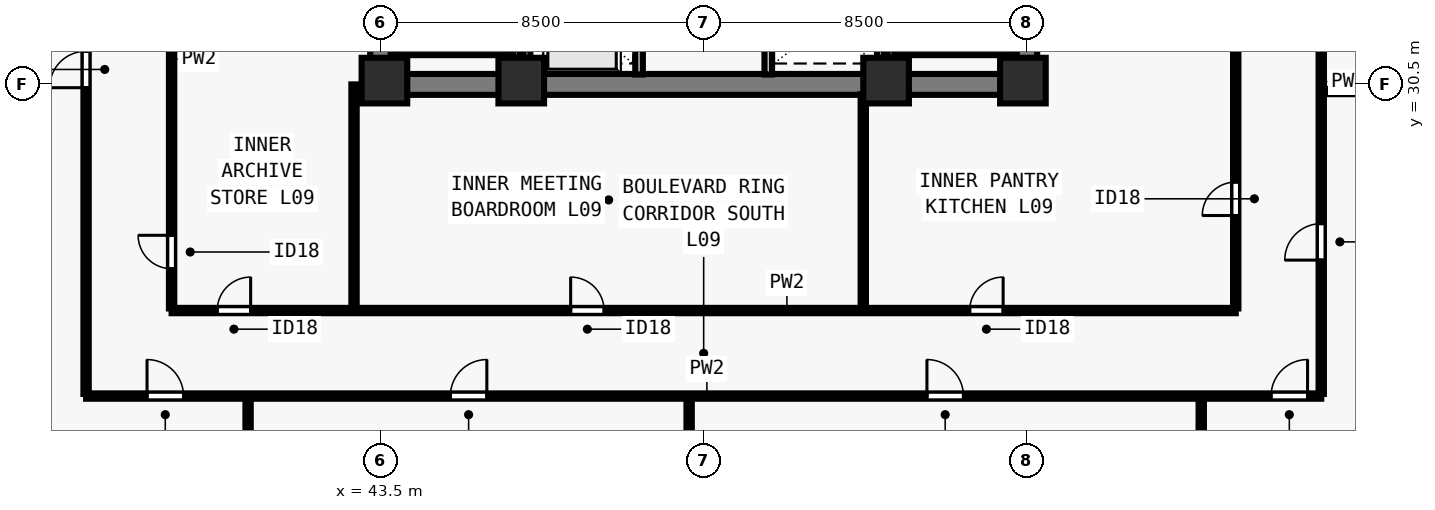
"""IFC4 building model, lengths in metres.
Left out: names, types, materials, properties, quantities, classifications, styles, units other than length and angle.
Written with IfcOpenShell. Run it as: python <this file> out.ifc"""

import sys

from ifc_helpers import new_model, si_unit, direction, frame, frame_2d, origin, origin_2d, place, context, subcontext, project, spatial, rectangle, extrude, element, fill, save


model = new_model("IFC4")
c1 = context("Model", 3, precision=1e-05, world=origin(), true_north=direction((0.0, 1.0)))
c2 = subcontext(c1, "Body", "Model", "MODEL_VIEW")
j1 = project(units=[si_unit("LENGTHUNIT", "METRE"), si_unit("PLANEANGLEUNIT", "RADIAN")], contexts=[c1])
p1 = place(None, origin())
s1 = spatial("IfcSite", under=j1, at=p1, CompositionType="ELEMENT")
p2 = place(p1, origin())
s2 = spatial("IfcBuilding", under=s1, at=p2, CompositionType="ELEMENT")
p3 = place(p2, frame((0.0, 0.0, 37.5)))
s3 = spatial("IfcBuildingStorey", under=s2, at=p3, CompositionType="ELEMENT", Elevation=37.5)
for number, where, z_axis, x_axis in (
    (1, (43.6, 30.6, 0.0), (0.0, 0.0, 1.0), (1.0, 0.0, 0.0)),
    (2, (47.2, 30.6, 0.0), (0.0, 0.0, 1.0), (1.0, 0.0, 0.0)),
    (3, (56.8, 30.6, 0.0), (0.0, 0.0, 1.0), (1.0, 0.0, 0.0)),
    (4, (60.4, 30.6, 0.0), (0.0, 0.0, 1.0), (1.0, 0.0, 0.0)),
):
    element("IfcColumn", number, at=place(p3, frame(where, z_axis=z_axis, x_axis=x_axis)), inside=s3, PredefinedType="COLUMN", context=c2, shape_type="SweptSolid", body=[
        extrude(rectangle(XDim=1.2, YDim=1.2, at=origin_2d()), origin(), (0.0, 0.0, 1.0), 3.5),
    ])
p4 = place(p3, frame((43.225, 30.5, 0.0), z_axis=(0.0, 0.0, 1.0), x_axis=(1.0, 0.0, 0.0)))
e5 = element("IfcWall", 5, at=p4, inside=s3, PredefinedType="SHEAR", context=c2, shape_type="SweptSolid", body=[
    extrude(rectangle(XDim=17.55, YDim=0.55, at=frame_2d((8.775, 0.0))), origin(), (0.0, 0.0, 1.0), 3.28),
])
for number, where, z_axis, x_axis in (
    (6, (43.5, 30.765, 0.0), (0.0, 0.0, 1.0), (0.0, 1.0, 0.0)),
    (7, (60.5, 30.765, 0.0), (0.0, 0.0, 1.0), (0.0, 1.0, 0.0)),
):
    element("IfcWall", number, at=place(p3, frame(where, z_axis=z_axis, x_axis=x_axis)), inside=s3, PredefinedType="SHEAR", context=c2, shape_type="SweptSolid", body=[
        extrude(rectangle(XDim=7.985, YDim=0.55, at=frame_2d((3.993, 0.0))), origin(), (0.0, 0.0, 1.0), 3.28),
    ])
p5 = place(p3, frame((50.3, 30.76, 0.0), z_axis=(0.0, 0.0, 1.0), x_axis=(0.0, 1.0, 0.0)))
e8 = element("IfcWall", 8, at=p5, inside=s3, PredefinedType="SOLIDWALL", context=c2, shape_type="SweptSolid", body=[
    extrude(rectangle(XDim=7.855, YDim=0.2, at=frame_2d((3.927, 0.0))), origin(), (0.0, 0.0, 1.0), 3.28),
])
p6 = place(p5, frame((0.79, 0.0, 0.0)))
e9 = element("IfcOpeningElement", 9, at=p6, cuts=e8, PredefinedType="OPENING", context=c2, shape_type="SweptSolid", body=[
    extrude(rectangle(XDim=1.1, YDim=2.2, at=frame_2d((0.55, 1.1))), frame((0.0, 0.11, 0.0), z_axis=(0.0, -1.0, 0.0), x_axis=(1.0, 0.0, 0.0)), (0.0, 0.0, 1.0), 0.22),
])
p7 = place(p5, frame((3.49, 0.0, 0.0)))
e10 = element("IfcOpeningElement", 10, at=p7, cuts=e8, PredefinedType="OPENING", context=c2, shape_type="SweptSolid", body=[
    extrude(rectangle(XDim=1.1, YDim=2.2, at=frame_2d((0.55, 1.1))), frame((0.0, 0.11, 0.0), z_axis=(0.0, -1.0, 0.0), x_axis=(1.0, 0.0, 0.0)), (0.0, 0.0, 1.0), 0.22),
])
p8 = place(p5, frame((6.19, 0.0, 0.0)))
e11 = element("IfcOpeningElement", 11, at=p8, cuts=e8, PredefinedType="OPENING", context=c2, shape_type="SweptSolid", body=[
    extrude(rectangle(XDim=1.1, YDim=2.2, at=frame_2d((0.55, 1.1))), frame((0.0, 0.11, 0.0), z_axis=(0.0, -1.0, 0.0), x_axis=(1.0, 0.0, 0.0)), (0.0, 0.0, 1.0), 0.22),
])
p9 = place(p3, frame((53.7, 30.76, 0.0), z_axis=(0.0, 0.0, 1.0), x_axis=(0.0, 1.0, 0.0)))
e12 = element("IfcWall", 12, at=p9, inside=s3, PredefinedType="SOLIDWALL", context=c2, shape_type="SweptSolid", body=[
    extrude(rectangle(XDim=7.855, YDim=0.2, at=frame_2d((3.927, 0.0))), origin(), (0.0, 0.0, 1.0), 3.28),
])
for number, where, z_axis, x_axis in (
    (13, (47.35, 30.76, 0.0), (0.0, 0.0, 1.0), (0.0, 1.0, 0.0)),
    (14, (56.65, 30.76, 0.0), (0.0, 0.0, 1.0), (0.0, 1.0, 0.0)),
):
    element("IfcWall", number, at=place(p3, frame(where, z_axis=z_axis, x_axis=x_axis)), inside=s3, PredefinedType="SOLIDWALL", context=c2, shape_type="SweptSolid", body=[
        extrude(rectangle(XDim=7.855, YDim=0.18, at=frame_2d((3.927, 0.0))), origin(), (0.0, 0.0, 1.0), 3.28),
    ])
p10 = place(p3, frame((35.75, 22.3, 0.0), z_axis=(0.0, 0.0, 1.0), x_axis=(1.0, 0.0, 0.0)))
e15 = element("IfcWall", 15, at=p10, inside=s3, PredefinedType="PARTITIONING", context=c2, shape_type="SweptSolid", body=[
    extrude(rectangle(XDim=32.5, YDim=0.14, at=frame_2d((16.25, 0.0))), origin(), (0.0, 0.0, 1.0), 3.28),
])
p11 = place(p10, frame((1.604, 0.0, 0.0)))
e16 = element("IfcOpeningElement", 16, at=p11, cuts=e15, PredefinedType="OPENING", context=c2, shape_type="SweptSolid", body=[
    extrude(rectangle(XDim=0.96, YDim=2.12, at=frame_2d((0.48, 1.06))), frame((0.0, 0.08, 0.0), z_axis=(0.0, -1.0, 0.0), x_axis=(1.0, 0.0, 0.0)), (0.0, 0.0, 1.0), 0.16),
])
p12 = place(p10, frame((9.585, 0.0, 0.0)))
e17 = element("IfcOpeningElement", 17, at=p12, cuts=e15, PredefinedType="OPENING", context=c2, shape_type="SweptSolid", body=[
    extrude(rectangle(XDim=0.96, YDim=2.12, at=frame_2d((0.48, 1.06))), frame((0.0, 0.08, 0.0), z_axis=(0.0, -1.0, 0.0), x_axis=(1.0, 0.0, 0.0)), (0.0, 0.0, 1.0), 0.16),
])
p13 = place(p10, frame((22.125, 0.0, 0.0)))
e18 = element("IfcOpeningElement", 18, at=p13, cuts=e15, PredefinedType="OPENING", context=c2, shape_type="SweptSolid", body=[
    extrude(rectangle(XDim=0.96, YDim=2.12, at=frame_2d((0.48, 1.06))), frame((0.0, 0.08, 0.0), z_axis=(0.0, -1.0, 0.0), x_axis=(1.0, 0.0, 0.0)), (0.0, 0.0, 1.0), 0.16),
])
p14 = place(p10, frame((31.18, 0.0, 0.0)))
e19 = element("IfcOpeningElement", 19, at=p14, cuts=e15, PredefinedType="OPENING", context=c2, shape_type="SweptSolid", body=[
    extrude(rectangle(XDim=0.96, YDim=2.12, at=frame_2d((0.48, 1.06))), frame((0.0, 0.08, 0.0), z_axis=(0.0, -1.0, 0.0), x_axis=(1.0, 0.0, 0.0)), (0.0, 0.0, 1.0), 0.16),
])
p15 = place(p3, frame((35.75, 22.355, 0.0), z_axis=(0.0, 0.0, 1.0), x_axis=(0.0, 1.0, 0.0)))
e20 = element("IfcWall", 20, at=p15, inside=s3, PredefinedType="PARTITIONING", context=c2, shape_type="SweptSolid", body=[
    extrude(rectangle(XDim=33.29, YDim=0.14, at=frame_2d((16.645, 0.0))), origin(), (0.0, 0.0, 1.0), 3.28),
])
p16 = place(p15, frame((8.058, 0.0, 0.0)))
e21 = element("IfcOpeningElement", 21, at=p16, cuts=e20, PredefinedType="OPENING", context=c2, shape_type="SweptSolid", body=[
    extrude(rectangle(XDim=0.96, YDim=2.12, at=frame_2d((0.48, 1.06))), frame((0.0, 0.08, 0.0), z_axis=(0.0, -1.0, 0.0), x_axis=(1.0, 0.0, 0.0)), (0.0, 0.0, 1.0), 0.16),
])
p17 = place(p15, frame((24.658, 0.0, 0.0)))
e22 = element("IfcOpeningElement", 22, at=p17, cuts=e20, PredefinedType="OPENING", context=c2, shape_type="SweptSolid", body=[
    extrude(rectangle(XDim=0.96, YDim=2.12, at=frame_2d((0.48, 1.06))), frame((0.0, 0.08, 0.0), z_axis=(0.0, -1.0, 0.0), x_axis=(1.0, 0.0, 0.0)), (0.0, 0.0, 1.0), 0.16),
])
p18 = place(p3, frame((68.25, 22.355, 0.0), z_axis=(0.0, 0.0, 1.0), x_axis=(0.0, 1.0, 0.0)))
e23 = element("IfcWall", 23, at=p18, inside=s3, PredefinedType="PARTITIONING", context=c2, shape_type="SweptSolid", body=[
    extrude(rectangle(XDim=33.29, YDim=0.14, at=frame_2d((16.645, 0.0))), origin(), (0.0, 0.0, 1.0), 3.28),
])
p19 = place(p18, frame((3.522, 0.0, 0.0)))
e24 = element("IfcOpeningElement", 24, at=p19, cuts=e23, PredefinedType="OPENING", context=c2, shape_type="SweptSolid", body=[
    extrude(rectangle(XDim=0.96, YDim=2.12, at=frame_2d((0.48, 1.06))), frame((0.0, 0.08, 0.0), z_axis=(0.0, -1.0, 0.0), x_axis=(1.0, 0.0, 0.0)), (0.0, 0.0, 1.0), 0.16),
])
p20 = place(p18, frame((11.956, 0.0, 0.0)))
e25 = element("IfcOpeningElement", 25, at=p20, cuts=e23, PredefinedType="OPENING", context=c2, shape_type="SweptSolid", body=[
    extrude(rectangle(XDim=0.96, YDim=2.12, at=frame_2d((0.48, 1.06))), frame((0.0, 0.08, 0.0), z_axis=(0.0, -1.0, 0.0), x_axis=(1.0, 0.0, 0.0)), (0.0, 0.0, 1.0), 0.16),
])
p21 = place(p18, frame((20.256, 0.0, 0.0)))
e26 = element("IfcOpeningElement", 26, at=p21, cuts=e23, PredefinedType="OPENING", context=c2, shape_type="SweptSolid", body=[
    extrude(rectangle(XDim=0.96, YDim=2.12, at=frame_2d((0.48, 1.06))), frame((0.0, 0.08, 0.0), z_axis=(0.0, -1.0, 0.0), x_axis=(1.0, 0.0, 0.0)), (0.0, 0.0, 1.0), 0.16),
])
p22 = place(p18, frame((28.422, 0.0, 0.0)))
e27 = element("IfcOpeningElement", 27, at=p22, cuts=e23, PredefinedType="OPENING", context=c2, shape_type="SweptSolid", body=[
    extrude(rectangle(XDim=0.96, YDim=2.12, at=frame_2d((0.48, 1.06))), frame((0.0, 0.08, 0.0), z_axis=(0.0, -1.0, 0.0), x_axis=(1.0, 0.0, 0.0)), (0.0, 0.0, 1.0), 0.16),
])
p23 = place(p3, frame((38.0, 24.55, 0.0), z_axis=(0.0, 0.0, 1.0), x_axis=(1.0, 0.0, 0.0)))
e28 = element("IfcWall", 28, at=p23, inside=s3, PredefinedType="PARTITIONING", context=c2, shape_type="SweptSolid", body=[
    extrude(rectangle(XDim=28.0, YDim=0.14, at=frame_2d((14.0, 0.0))), origin(), (0.0, 0.0, 1.0), 3.28),
])
p24 = place(p23, frame((1.2, 0.0, 0.0)))
e29 = element("IfcOpeningElement", 29, at=p24, cuts=e28, PredefinedType="OPENING", context=c2, shape_type="SweptSolid", body=[
    extrude(rectangle(XDim=0.88, YDim=2.1, at=frame_2d((0.44, 1.05))), frame((0.0, 0.08, 0.0), z_axis=(0.0, -1.0, 0.0), x_axis=(1.0, 0.0, 0.0)), (0.0, 0.0, 1.0), 0.16),
])
p25 = place(p23, frame((10.5, 0.0, 0.0)))
e30 = element("IfcOpeningElement", 30, at=p25, cuts=e28, PredefinedType="OPENING", context=c2, shape_type="SweptSolid", body=[
    extrude(rectangle(XDim=0.88, YDim=2.1, at=frame_2d((0.44, 1.05))), frame((0.0, 0.08, 0.0), z_axis=(0.0, -1.0, 0.0), x_axis=(1.0, 0.0, 0.0)), (0.0, 0.0, 1.0), 0.16),
])
p26 = place(p23, frame((21.0, 0.0, 0.0)))
e31 = element("IfcOpeningElement", 31, at=p26, cuts=e28, PredefinedType="OPENING", context=c2, shape_type="SweptSolid", body=[
    extrude(rectangle(XDim=0.88, YDim=2.1, at=frame_2d((0.44, 1.05))), frame((0.0, 0.08, 0.0), z_axis=(0.0, -1.0, 0.0), x_axis=(1.0, 0.0, 0.0)), (0.0, 0.0, 1.0), 0.16),
])
p27 = place(p3, frame((38.0, 24.605, 0.0), z_axis=(0.0, 0.0, 1.0), x_axis=(0.0, 1.0, 0.0)))
e32 = element("IfcWall", 32, at=p27, inside=s3, PredefinedType="PARTITIONING", context=c2, shape_type="SweptSolid", body=[
    extrude(rectangle(XDim=14.145, YDim=0.14, at=frame_2d((7.073, 0.0))), origin(), (0.0, 0.0, 1.0), 3.28),
])
p28 = place(p27, frame((1.045, 0.0, 0.0)))
e33 = element("IfcOpeningElement", 33, at=p28, cuts=e32, PredefinedType="OPENING", context=c2, shape_type="SweptSolid", body=[
    extrude(rectangle(XDim=0.88, YDim=2.1, at=frame_2d((0.44, 1.05))), frame((0.0, 0.08, 0.0), z_axis=(0.0, -1.0, 0.0), x_axis=(1.0, 0.0, 0.0)), (0.0, 0.0, 1.0), 0.16),
])
p29 = place(p27, frame((11.195, 0.0, 0.0)))
e34 = element("IfcOpeningElement", 34, at=p29, cuts=e32, PredefinedType="OPENING", context=c2, shape_type="SweptSolid", body=[
    extrude(rectangle(XDim=0.88, YDim=2.1, at=frame_2d((0.44, 1.05))), frame((0.0, 0.08, 0.0), z_axis=(0.0, -1.0, 0.0), x_axis=(1.0, 0.0, 0.0)), (0.0, 0.0, 1.0), 0.16),
])
p30 = place(p3, frame((66.0, 24.605, 0.0), z_axis=(0.0, 0.0, 1.0), x_axis=(0.0, 1.0, 0.0)))
e35 = element("IfcWall", 35, at=p30, inside=s3, PredefinedType="PARTITIONING", context=c2, shape_type="SweptSolid", body=[
    extrude(rectangle(XDim=14.145, YDim=0.14, at=frame_2d((7.073, 0.0))), origin(), (0.0, 0.0, 1.0), 3.28),
])
p31 = place(p30, frame((2.445, 0.0, 0.0)))
e36 = element("IfcOpeningElement", 36, at=p31, cuts=e35, PredefinedType="OPENING", context=c2, shape_type="SweptSolid", body=[
    extrude(rectangle(XDim=0.88, YDim=2.1, at=frame_2d((0.44, 1.05))), frame((0.0, 0.08, 0.0), z_axis=(0.0, -1.0, 0.0), x_axis=(1.0, 0.0, 0.0)), (0.0, 0.0, 1.0), 0.16),
])
p32 = place(p3, frame((42.8, 24.605, 0.0), z_axis=(0.0, 0.0, 1.0), x_axis=(0.0, 1.0, 0.0)))
e37 = element("IfcWall", 37, at=p32, inside=s3, PredefinedType="PARTITIONING", context=c2, shape_type="SweptSolid", body=[
    extrude(rectangle(XDim=5.895, YDim=0.14, at=frame_2d((2.948, 0.0))), origin(), (0.0, 0.0, 1.0), 2.439),
])
p33 = place(p3, frame((56.2, 24.605, 0.0), z_axis=(0.0, 0.0, 1.0), x_axis=(0.0, 1.0, 0.0)))
e38 = element("IfcWall", 38, at=p33, inside=s3, PredefinedType="PARTITIONING", context=c2, shape_type="SweptSolid", body=[
    extrude(rectangle(XDim=5.635, YDim=0.14, at=frame_2d((2.817, 0.0))), origin(), (0.0, 0.0, 1.0), 2.849),
])
p34 = place(p3, frame((40.012, 13.92, 0.0), z_axis=(0.0, 0.0, 1.0), x_axis=(0.0, 1.0, 0.0)))
e39 = element("IfcWall", 39, at=p34, inside=s3, PredefinedType="PARTITIONING", context=c2, shape_type="SweptSolid", body=[
    extrude(rectangle(XDim=8.28, YDim=0.14, at=frame_2d((4.14, 0.0))), origin(), (0.0, 0.0, 1.0), 3.28),
])
p35 = place(p3, frame((51.617, 13.92, 0.0), z_axis=(0.0, 0.0, 1.0), x_axis=(0.0, 1.0, 0.0)))
e40 = element("IfcWall", 40, at=p35, inside=s3, PredefinedType="PARTITIONING", context=c2, shape_type="SweptSolid", body=[
    extrude(rectangle(XDim=8.28, YDim=0.14, at=frame_2d((4.14, 0.0))), origin(), (0.0, 0.0, 1.0), 2.849),
])
p36 = place(p3, frame((65.093, 13.92, 0.0), z_axis=(0.0, 0.0, 1.0), x_axis=(0.0, 1.0, 0.0)))
e41 = element("IfcWall", 41, at=p36, inside=s3, PredefinedType="PARTITIONING", context=c2, shape_type="SweptSolid", body=[
    extrude(rectangle(XDim=8.28, YDim=0.14, at=frame_2d((4.14, 0.0))), origin(), (0.0, 0.0, 1.0), 3.28),
])
p37 = place(p3, frame((68.35, 30.313, 0.0), z_axis=(0.0, 0.0, 1.0), x_axis=(1.0, 0.0, 0.0)))
e42 = element("IfcWall", 42, at=p37, inside=s3, PredefinedType="PARTITIONING", context=c2, shape_type="SweptSolid", body=[
    extrude(rectangle(XDim=8.73, YDim=0.14, at=frame_2d((4.365, 0.0))), origin(), (0.0, 0.0, 1.0), 3.28),
])
p38 = place(p3, frame((43.765, 31.36, 0.0), z_axis=(0.0, 0.0, 1.0), x_axis=(1.0, 0.0, 0.0)))
e43 = element("IfcWall", 43, at=p38, inside=s3, PredefinedType="SOLIDWALL", context=c2, shape_type="SweptSolid", body=[
    extrude(rectangle(XDim=3.23, YDim=0.18, at=frame_2d((1.615, 0.0))), origin(), (0.0, 0.0, 1.0), 3.28),
])
p39 = place(p3, frame((47.07, 38.78, 0.0), z_axis=(0.0, 0.0, 1.0), x_axis=(0.0, -1.0, 0.0)))
e44 = element("IfcWall", 44, at=p39, inside=s3, PredefinedType="SOLIDWALL", context=c2, shape_type="SweptSolid", body=[
    extrude(rectangle(XDim=8.017, YDim=0.18, at=frame_2d((4.009, 0.0))), origin(), (0.0, 0.0, 1.0), 3.28),
])
p40 = place(p3, frame((57.005, 31.36, 0.0), z_axis=(0.0, 0.0, 1.0), x_axis=(1.0, 0.0, 0.0)))
e45 = element("IfcWall", 45, at=p40, inside=s3, PredefinedType="SOLIDWALL", context=c2, shape_type="SweptSolid", body=[
    extrude(rectangle(XDim=3.23, YDim=0.18, at=frame_2d((1.615, 0.0))), origin(), (0.0, 0.0, 1.0), 3.28),
])
p41 = place(p3, frame((56.93, 38.78, 0.0), z_axis=(0.0, 0.0, 1.0), x_axis=(0.0, -1.0, 0.0)))
e46 = element("IfcWall", 46, at=p41, inside=s3, PredefinedType="SOLIDWALL", context=c2, shape_type="SweptSolid", body=[
    extrude(rectangle(XDim=8.017, YDim=0.18, at=frame_2d((4.009, 0.0))), origin(), (0.0, 0.0, 1.0), 3.28),
])
p42 = place(p24, origin())
e47 = element("IfcDoor", 47, at=p42, inside=s3, OperationType="SINGLE_SWING_RIGHT", PredefinedType="DOOR", context=c2, shape_type="SweptSolid", body=[
    extrude(rectangle(XDim=0.88, YDim=2.1, at=frame_2d((0.44, 1.05))), frame((0.0, 0.025, 0.0), z_axis=(0.0, -1.0, 0.0), x_axis=(1.0, 0.0, 0.0)), (0.0, 0.0, 1.0), 0.05),
])
fill(e29, e47)
p43 = place(p25, origin())
e48 = element("IfcDoor", 48, at=p43, inside=s3, OperationType="SINGLE_SWING_LEFT", PredefinedType="DOOR", context=c2, shape_type="SweptSolid", body=[
    extrude(rectangle(XDim=0.88, YDim=2.1, at=frame_2d((0.44, 1.05))), frame((0.0, 0.025, 0.0), z_axis=(0.0, -1.0, 0.0), x_axis=(1.0, 0.0, 0.0)), (0.0, 0.0, 1.0), 0.05),
])
fill(e30, e48)
p44 = place(p26, origin())
e49 = element("IfcDoor", 49, at=p44, inside=s3, OperationType="SINGLE_SWING_RIGHT", PredefinedType="DOOR", context=c2, shape_type="SweptSolid", body=[
    extrude(rectangle(XDim=0.88, YDim=2.1, at=frame_2d((0.44, 1.05))), frame((0.0, 0.025, 0.0), z_axis=(0.0, -1.0, 0.0), x_axis=(1.0, 0.0, 0.0)), (0.0, 0.0, 1.0), 0.05),
])
fill(e31, e49)
p45 = place(p28, origin())
e50 = element("IfcDoor", 50, at=p45, inside=s3, OperationType="SINGLE_SWING_RIGHT", PredefinedType="DOOR", context=c2, shape_type="SweptSolid", body=[
    extrude(rectangle(XDim=0.88, YDim=2.1, at=frame_2d((0.44, 1.05))), frame((0.0, 0.025, 0.0), z_axis=(0.0, -1.0, 0.0), x_axis=(1.0, 0.0, 0.0)), (0.0, 0.0, 1.0), 0.05),
])
fill(e33, e50)
p46 = place(p31, origin())
e51 = element("IfcDoor", 51, at=p46, inside=s3, OperationType="SINGLE_SWING_LEFT", PredefinedType="DOOR", context=c2, shape_type="SweptSolid", body=[
    extrude(rectangle(XDim=0.88, YDim=2.1, at=frame_2d((0.44, 1.05))), frame((0.0, 0.025, 0.0), z_axis=(0.0, -1.0, 0.0), x_axis=(1.0, 0.0, 0.0)), (0.0, 0.0, 1.0), 0.05),
])
fill(e36, e51)
p47 = place(p11, origin())
e52 = element("IfcDoor", 52, at=p47, inside=s3, OperationType="SINGLE_SWING_LEFT", PredefinedType="DOOR", context=c2, shape_type="SweptSolid", body=[
    extrude(rectangle(XDim=0.96, YDim=2.12, at=frame_2d((0.48, 1.06))), frame((0.0, 0.025, 0.0), z_axis=(0.0, -1.0, 0.0), x_axis=(1.0, 0.0, 0.0)), (0.0, 0.0, 1.0), 0.05),
])
fill(e16, e52)
p48 = place(p12, origin())
e53 = element("IfcDoor", 53, at=p48, inside=s3, OperationType="SINGLE_SWING_RIGHT", PredefinedType="DOOR", context=c2, shape_type="SweptSolid", body=[
    extrude(rectangle(XDim=0.96, YDim=2.12, at=frame_2d((0.48, 1.06))), frame((0.0, 0.025, 0.0), z_axis=(0.0, -1.0, 0.0), x_axis=(1.0, 0.0, 0.0)), (0.0, 0.0, 1.0), 0.05),
])
fill(e17, e53)
p49 = place(p13, origin())
e54 = element("IfcDoor", 54, at=p49, inside=s3, OperationType="SINGLE_SWING_LEFT", PredefinedType="DOOR", context=c2, shape_type="SweptSolid", body=[
    extrude(rectangle(XDim=0.96, YDim=2.12, at=frame_2d((0.48, 1.06))), frame((0.0, 0.025, 0.0), z_axis=(0.0, -1.0, 0.0), x_axis=(1.0, 0.0, 0.0)), (0.0, 0.0, 1.0), 0.05),
])
fill(e18, e54)
p50 = place(p14, origin())
e55 = element("IfcDoor", 55, at=p50, inside=s3, OperationType="SINGLE_SWING_RIGHT", PredefinedType="DOOR", context=c2, shape_type="SweptSolid", body=[
    extrude(rectangle(XDim=0.96, YDim=2.12, at=frame_2d((0.48, 1.06))), frame((0.0, 0.025, 0.0), z_axis=(0.0, -1.0, 0.0), x_axis=(1.0, 0.0, 0.0)), (0.0, 0.0, 1.0), 0.05),
])
fill(e19, e55)
p51 = place(p16, origin())
e56 = element("IfcDoor", 56, at=p51, inside=s3, OperationType="SINGLE_SWING_LEFT", PredefinedType="DOOR", context=c2, shape_type="SweptSolid", body=[
    extrude(rectangle(XDim=0.96, YDim=2.12, at=frame_2d((0.48, 1.06))), frame((0.0, 0.025, 0.0), z_axis=(0.0, -1.0, 0.0), x_axis=(1.0, 0.0, 0.0)), (0.0, 0.0, 1.0), 0.05),
])
fill(e21, e56)
p52 = place(p19, origin())
e57 = element("IfcDoor", 57, at=p52, inside=s3, OperationType="SINGLE_SWING_LEFT", PredefinedType="DOOR", context=c2, shape_type="SweptSolid", body=[
    extrude(rectangle(XDim=0.96, YDim=2.12, at=frame_2d((0.48, 1.06))), frame((0.0, 0.025, 0.0), z_axis=(0.0, -1.0, 0.0), x_axis=(1.0, 0.0, 0.0)), (0.0, 0.0, 1.0), 0.05),
])
fill(e24, e57)
save(model, sys.argv[1])
